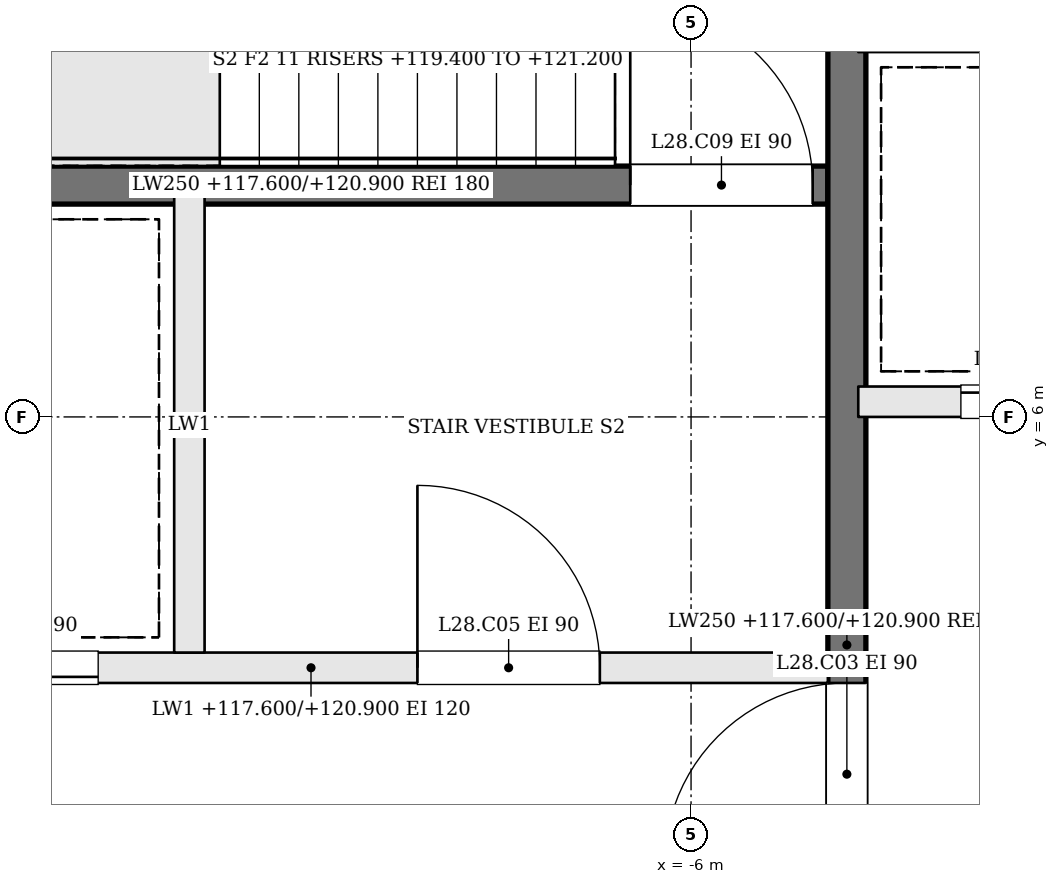
"""IFC4 building model, lengths in metres.
Left out: names, types, materials, properties, quantities, classifications, styles, units other than length and angle.
Written with IfcOpenShell. Run it as: python <this file> out.ifc"""

import sys

from ifc_helpers import new_model, si_unit, direction, frame, frame_2d, origin, place, context, subcontext, project, spatial, rectangle, extrude, element, fill, save


model = new_model("IFC4")
c1 = context("Model", 3, precision=1e-05, world=origin(), true_north=direction((0.0, 1.0)))
c2 = subcontext(c1, "Body", "Model", "MODEL_VIEW")
j1 = project(units=[si_unit("LENGTHUNIT", "METRE"), si_unit("PLANEANGLEUNIT", "RADIAN")], contexts=[c1])
p1 = place(None, origin())
s1 = spatial("IfcSite", under=j1, at=p1, CompositionType="ELEMENT")
p2 = place(p1, origin())
s2 = spatial("IfcBuilding", under=s1, at=p2, CompositionType="ELEMENT")
p3 = place(p2, frame((0.0, 0.0, 117.6)))
s3 = spatial("IfcBuildingStorey", under=s2, at=p3, CompositionType="ELEMENT", Elevation=117.6)
p4 = place(p3, frame((-11.9, 4.35, 0.0), z_axis=(0.0, 0.0, 1.0), x_axis=(1.0, 0.0, 0.0)))
e1 = element("IfcWall", 1, at=p4, inside=s3, PredefinedType="SOLIDWALL", context=c2, shape_type="SweptSolid", body=[
    extrude(rectangle(XDim=6.8, YDim=0.2, at=frame_2d((3.4, 0.0))), origin(), (0.0, 0.0, 1.0), 3.3),
])
p5 = place(p4, frame((4.1, 0.0, 0.0)))
e2 = element("IfcOpeningElement", 2, at=p5, cuts=e1, PredefinedType="OPENING", context=c2, shape_type="SweptSolid", body=[
    extrude(rectangle(XDim=1.2, YDim=2.1, at=frame_2d((0.6, 1.05))), frame((0.0, 0.11, 0.0), z_axis=(0.0, -1.0, 0.0), x_axis=(1.0, 0.0, 0.0)), (0.0, 0.0, 1.0), 0.22),
])
p6 = place(p4, frame((0.8, 0.0, 0.0)))
e3 = element("IfcOpeningElement", 3, at=p6, cuts=e1, PredefinedType="OPENING", context=c2, shape_type="SweptSolid", body=[
    extrude(rectangle(XDim=1.2, YDim=2.1, at=frame_2d((0.6, 1.05))), frame((0.0, 0.11, 0.0), z_axis=(0.0, -1.0, 0.0), x_axis=(1.0, 0.0, 0.0)), (0.0, 0.0, 1.0), 0.22),
])
p7 = place(p3, frame((-11.9, 7.525, 0.0), z_axis=(0.0, 0.0, 1.0), x_axis=(1.0, 0.0, 0.0)))
e4 = element("IfcWall", 4, at=p7, inside=s3, PredefinedType="SOLIDWALL", context=c2, shape_type="SweptSolid", body=[
    extrude(rectangle(XDim=6.8, YDim=0.25, at=frame_2d((3.4, 0.0))), origin(), (0.0, 0.0, 1.0), 3.3),
])
p8 = place(p7, frame((5.5, 0.0, 0.0)))
e5 = element("IfcOpeningElement", 5, at=p8, cuts=e4, PredefinedType="OPENING", context=c2, shape_type="SweptSolid", body=[
    extrude(rectangle(XDim=1.2, YDim=2.1, at=frame_2d((0.6, 1.05))), frame((0.0, 0.135, 0.0), z_axis=(0.0, -1.0, 0.0), x_axis=(1.0, 0.0, 0.0)), (0.0, 0.0, 1.0), 0.27),
])
p9 = place(p3, frame((-9.3, 4.45, 0.0), z_axis=(0.0, 0.0, 1.0), x_axis=(0.0, 1.0, 0.0)))
e6 = element("IfcWall", 6, at=p9, inside=s3, PredefinedType="SOLIDWALL", context=c2, shape_type="SweptSolid", body=[
    extrude(rectangle(XDim=3.0, YDim=0.2, at=frame_2d((1.5, 0.0))), origin(), (0.0, 0.0, 1.0), 3.3),
])
p10 = place(p3, frame((-4.975, -1.9, 0.0), z_axis=(0.0, 0.0, 1.0), x_axis=(0.0, 1.0, 0.0)))
e7 = element("IfcWall", 7, at=p10, inside=s3, PredefinedType="SOLIDWALL", context=c2, shape_type="SweptSolid", body=[
    extrude(rectangle(XDim=12.8, YDim=0.25, at=frame_2d((6.4, 0.0))), origin(), (0.0, 0.0, 1.0), 3.3),
])
p11 = place(p10, frame((4.95, 0.0, 0.0)))
e8 = element("IfcOpeningElement", 8, at=p11, cuts=e7, PredefinedType="OPENING", context=c2, shape_type="SweptSolid", body=[
    extrude(rectangle(XDim=1.2, YDim=2.1, at=frame_2d((0.6, 1.05))), frame((0.0, 0.135, 0.0), z_axis=(0.0, -1.0, 0.0), x_axis=(1.0, 0.0, 0.0)), (0.0, 0.0, 1.0), 0.27),
])
p12 = place(p3, frame((-4.9, 6.1, 0.0), z_axis=(0.0, 0.0, 1.0), x_axis=(1.0, 0.0, 0.0)))
e9 = element("IfcWall", 9, at=p12, inside=s3, PredefinedType="SOLIDWALL", context=c2, shape_type="SweptSolid", body=[
    extrude(rectangle(XDim=9.8, YDim=0.2, at=frame_2d((4.9, 0.0))), origin(), (0.0, 0.0, 1.0), 3.3),
])
p13 = place(p12, frame((0.675, 0.0, 0.0)))
e10 = element("IfcOpeningElement", 10, at=p13, cuts=e9, PredefinedType="OPENING", context=c2, shape_type="SweptSolid", body=[
    extrude(rectangle(XDim=1.1, YDim=2.1, at=frame_2d((0.55, 1.05))), frame((0.0, 0.11, 0.0), z_axis=(0.0, -1.0, 0.0), x_axis=(1.0, 0.0, 0.0)), (0.0, 0.0, 1.0), 0.22),
])
p14 = place(p12, frame((3.125, 0.0, 0.0)))
e11 = element("IfcOpeningElement", 11, at=p14, cuts=e9, PredefinedType="OPENING", context=c2, shape_type="SweptSolid", body=[
    extrude(rectangle(XDim=1.1, YDim=2.1, at=frame_2d((0.55, 1.05))), frame((0.0, 0.11, 0.0), z_axis=(0.0, -1.0, 0.0), x_axis=(1.0, 0.0, 0.0)), (0.0, 0.0, 1.0), 0.22),
])
p15 = place(p12, frame((5.575, 0.0, 0.0)))
e12 = element("IfcOpeningElement", 12, at=p15, cuts=e9, PredefinedType="OPENING", context=c2, shape_type="SweptSolid", body=[
    extrude(rectangle(XDim=1.1, YDim=2.1, at=frame_2d((0.55, 1.05))), frame((0.0, 0.11, 0.0), z_axis=(0.0, -1.0, 0.0), x_axis=(1.0, 0.0, 0.0)), (0.0, 0.0, 1.0), 0.22),
])
p16 = place(p12, frame((8.025, 0.0, 0.0)))
e13 = element("IfcOpeningElement", 13, at=p16, cuts=e9, PredefinedType="OPENING", context=c2, shape_type="SweptSolid", body=[
    extrude(rectangle(XDim=1.1, YDim=2.1, at=frame_2d((0.55, 1.05))), frame((0.0, 0.11, 0.0), z_axis=(0.0, -1.0, 0.0), x_axis=(1.0, 0.0, 0.0)), (0.0, 0.0, 1.0), 0.22),
])
p17 = place(p11, origin())
e14 = element("IfcDoor", 14, at=p17, inside=s3, OperationType="SINGLE_SWING_LEFT", PredefinedType="DOOR", context=c2, shape_type="SweptSolid", body=[
    extrude(rectangle(XDim=1.2, YDim=2.1, at=frame_2d((0.6, 1.05))), frame((0.0, 0.025, 0.0), z_axis=(0.0, -1.0, 0.0), x_axis=(1.0, 0.0, 0.0)), (0.0, 0.0, 1.0), 0.05),
])
fill(e8, e14)
p18 = place(p5, origin())
e15 = element("IfcDoor", 15, at=p18, inside=s3, OperationType="SINGLE_SWING_LEFT", PredefinedType="DOOR", context=c2, shape_type="SweptSolid", body=[
    extrude(rectangle(XDim=1.2, YDim=2.1, at=frame_2d((0.6, 1.05))), frame((0.0, 0.025, 0.0), z_axis=(0.0, -1.0, 0.0), x_axis=(1.0, 0.0, 0.0)), (0.0, 0.0, 1.0), 0.05),
])
fill(e2, e15)
p19 = place(p8, origin())
e16 = element("IfcDoor", 16, at=p19, inside=s3, OperationType="SINGLE_SWING_LEFT", PredefinedType="DOOR", context=c2, shape_type="SweptSolid", body=[
    extrude(rectangle(XDim=1.2, YDim=2.1, at=frame_2d((0.6, 1.05))), frame((0.0, 0.025, 0.0), z_axis=(0.0, -1.0, 0.0), x_axis=(1.0, 0.0, 0.0)), (0.0, 0.0, 1.0), 0.05),
])
fill(e5, e16)
p20 = place(p6, origin())
e17 = element("IfcDoor", 17, at=p20, inside=s3, OperationType="SLIDING_TO_RIGHT", PredefinedType="DOOR", context=c2, shape_type="SweptSolid", body=[
    extrude(rectangle(XDim=1.2, YDim=2.1, at=frame_2d((0.6, 1.05))), frame((0.0, 0.025, 0.0), z_axis=(0.0, -1.0, 0.0), x_axis=(1.0, 0.0, 0.0)), (0.0, 0.0, 1.0), 0.05),
])
fill(e3, e17)
p21 = place(p13, origin())
e18 = element("IfcDoor", 18, at=p21, inside=s3, OperationType="SLIDING_TO_RIGHT", PredefinedType="DOOR", context=c2, shape_type="SweptSolid", body=[
    extrude(rectangle(XDim=1.1, YDim=2.1, at=frame_2d((0.55, 1.05))), frame((0.0, 0.025, 0.0), z_axis=(0.0, -1.0, 0.0), x_axis=(1.0, 0.0, 0.0)), (0.0, 0.0, 1.0), 0.05),
])
fill(e10, e18)
save(model, sys.argv[1])
